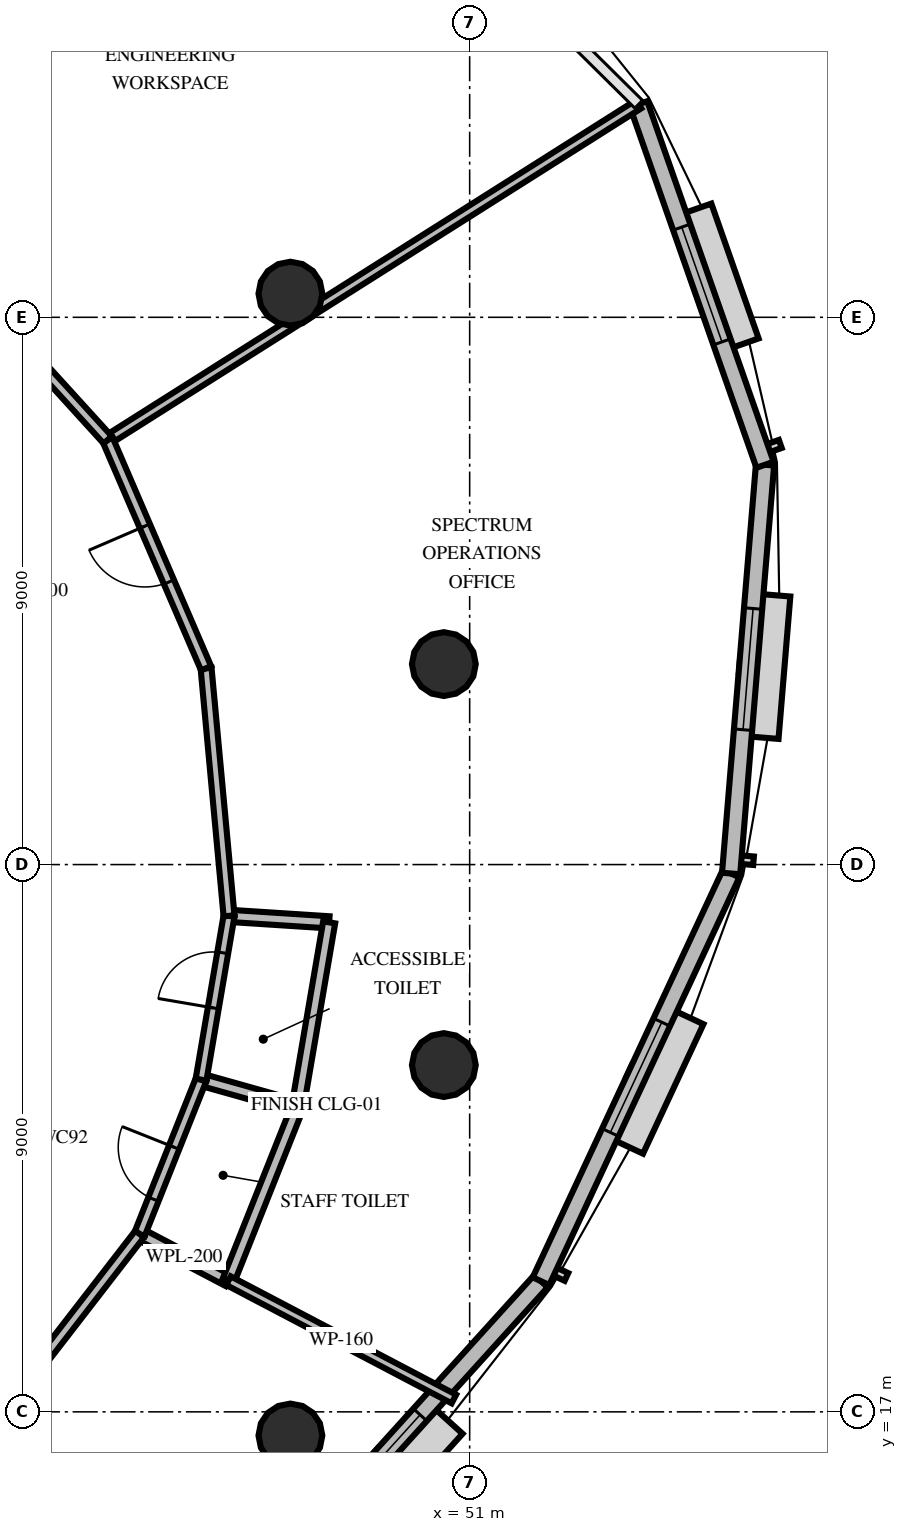
"""IFC4 building model, lengths in metres.
Left out: names, types, materials, properties, quantities, classifications, styles, units other than length and angle.
Written with IfcOpenShell. Run it as: python <this file> out.ifc"""

import sys

from ifc_helpers import new_model, si_unit, direction, frame, frame_2d, origin, origin_2d, place, context, subcontext, project, spatial, rectangle, circle, extrude, element, fill, save


model = new_model("IFC4")
c1 = context("Model", 3, precision=1e-05, world=origin(), true_north=direction((0.0, 1.0)))
c2 = subcontext(c1, "Body", "Model", "MODEL_VIEW")
j1 = project(units=[si_unit("LENGTHUNIT", "METRE"), si_unit("PLANEANGLEUNIT", "RADIAN")], contexts=[c1])
p1 = place(None, origin())
s1 = spatial("IfcSite", under=j1, at=p1, CompositionType="ELEMENT")
p2 = place(p1, origin())
s2 = spatial("IfcBuilding", under=s1, at=p2, CompositionType="ELEMENT")
p3 = place(p2, frame((0.0, 0.0, 170.0)))
s3 = spatial("IfcBuildingStorey", under=s2, at=p3, CompositionType="ELEMENT", Elevation=170.0)
for number, where, z_axis, x_axis in (
    (1, (50.575, 29.297, 0.0), (0.0, 0.0, 1.0), (1.0, 0.0, 0.0)),
    (2, (48.052, 35.389, 0.0), (0.0, 0.0, 1.0), (1.0, 0.0, 0.0)),
    (3, (48.052, 16.611, 0.0), (0.0, 0.0, 1.0), (1.0, 0.0, 0.0)),
    (4, (50.575, 22.703, 0.0), (0.0, 0.0, 1.0), (1.0, 0.0, 0.0)),
):
    element("IfcColumn", number, at=place(p3, frame(where, z_axis=z_axis, x_axis=x_axis)), inside=s3, PredefinedType="COLUMN", context=c2, shape_type="SweptSolid", body=[
        extrude(circle(Radius=0.525, at=origin_2d()), origin(), (0.0, 0.0, 1.0), 3.6),
    ])
p4 = place(p3, frame((46.854, 13.271, 0.0), z_axis=(0.0, 0.0, 1.0), x_axis=(0.670978643617, 0.741476675162, 0.0)))
e5 = element("IfcWall", 5, at=p4, inside=s3, PredefinedType="SOLIDWALL", context=c2, shape_type="SweptSolid", body=[
    extrude(rectangle(XDim=7.927, YDim=0.3, at=frame_2d((3.963, 0.0))), origin(), (0.0, 0.0, 1.0), 2.66),
])
p5 = place(p4, frame((2.964, 0.0, 0.8)))
e6 = element("IfcOpeningElement", 6, at=p5, cuts=e5, PredefinedType="OPENING", context=c2, shape_type="SweptSolid", body=[
    extrude(rectangle(XDim=2.0, YDim=1.85, at=frame_2d((1.0, 0.925))), frame((0.0, 0.16, 0.0), z_axis=(0.0, -1.0, 0.0), x_axis=(1.0, 0.0, 0.0)), (0.0, 0.0, 1.0), 0.32),
])
p6 = place(p3, frame((52.173, 19.149, 0.0), z_axis=(0.0, 0.0, 1.0), x_axis=(0.422665033613, 0.906285975485, 0.0)))
e7 = element("IfcWall", 7, at=p6, inside=s3, PredefinedType="SOLIDWALL", context=c2, shape_type="SweptSolid", body=[
    extrude(rectangle(XDim=7.398, YDim=0.3, at=frame_2d((3.699, 0.0))), origin(), (0.0, 0.0, 1.0), 2.66),
])
p7 = place(p6, frame((2.699, 0.0, 0.8)))
e8 = element("IfcOpeningElement", 8, at=p7, cuts=e7, PredefinedType="OPENING", context=c2, shape_type="SweptSolid", body=[
    extrude(rectangle(XDim=2.0, YDim=1.85, at=frame_2d((1.0, 0.925))), frame((0.0, 0.16, 0.0), z_axis=(0.0, -1.0, 0.0), x_axis=(1.0, 0.0, 0.0)), (0.0, 0.0, 1.0), 0.32),
])
p8 = place(p3, frame((55.3, 25.853, 0.0), z_axis=(0.0, 0.0, 1.0), x_axis=(0.082706983643, 0.996573908376, 0.0)))
e9 = element("IfcWall", 9, at=p8, inside=s3, PredefinedType="SOLIDWALL", context=c2, shape_type="SweptSolid", body=[
    extrude(rectangle(XDim=6.745, YDim=0.3, at=frame_2d((3.373, 0.0))), origin(), (0.0, 0.0, 1.0), 2.66),
])
p9 = place(p8, frame((2.373, 0.0, 0.8)))
e10 = element("IfcOpeningElement", 10, at=p9, cuts=e9, PredefinedType="OPENING", context=c2, shape_type="SweptSolid", body=[
    extrude(rectangle(XDim=2.0, YDim=1.85, at=frame_2d((1.0, 0.925))), frame((0.0, 0.16, 0.0), z_axis=(0.0, -1.0, 0.0), x_axis=(1.0, 0.0, 0.0)), (0.0, 0.0, 1.0), 0.32),
])
p10 = place(p3, frame((55.858, 32.575, 0.0), z_axis=(0.0, 0.0, 1.0), x_axis=(-0.330843687111, 0.943685569826, 0.0)))
e11 = element("IfcWall", 11, at=p10, inside=s3, PredefinedType="SOLIDWALL", context=c2, shape_type="SweptSolid", body=[
    extrude(rectangle(XDim=6.283, YDim=0.3, at=frame_2d((3.141, 0.0))), origin(), (0.0, 0.0, 1.0), 2.66),
])
p11 = place(p10, frame((2.141, 0.0, 0.8)))
e12 = element("IfcOpeningElement", 12, at=p11, cuts=e11, PredefinedType="OPENING", context=c2, shape_type="SweptSolid", body=[
    extrude(rectangle(XDim=2.0, YDim=1.85, at=frame_2d((1.0, 0.925))), frame((0.0, 0.16, 0.0), z_axis=(0.0, -1.0, 0.0), x_axis=(1.0, 0.0, 0.0)), (0.0, 0.0, 1.0), 0.32),
])
p12 = place(p3, frame((45.572, 19.925, 0.0), z_axis=(0.0, 0.0, 1.0), x_axis=(0.885373544206, -0.464880293431, 0.0)))
e13 = element("IfcWall", 13, at=p12, inside=s3, PredefinedType="PLUMBINGWALL", context=c2, shape_type="SweptSolid", body=[
    extrude(rectangle(XDim=1.65, YDim=0.2, at=frame_2d((0.825, 0.0))), origin(), (0.0, 0.0, 1.0), 2.46),
])
p13 = place(p3, frame((46.583, 22.463, 0.0), z_axis=(0.0, 0.0, 1.0), x_axis=(0.962682268187, -0.27063416362, 0.0)))
e14 = element("IfcWall", 14, at=p13, inside=s3, PredefinedType="PLUMBINGWALL", context=c2, shape_type="SweptSolid", body=[
    extrude(rectangle(XDim=1.65, YDim=0.2, at=frame_2d((0.825, 0.0))), origin(), (0.0, 0.0, 1.0), 2.46),
])
p14 = place(p3, frame((47.033, 19.157, 0.0), z_axis=(0.0, 0.0, 1.0), x_axis=(0.36976244951, 0.929126326681, 0.0)))
e15 = element("IfcWall", 15, at=p14, inside=s3, PredefinedType="PLUMBINGWALL", context=c2, shape_type="SweptSolid", body=[
    extrude(rectangle(XDim=3.077, YDim=0.2, at=frame_2d((1.539, 0.0))), origin(), (0.0, 0.0, 1.0), 2.46),
])
p15 = place(p3, frame((45.572, 19.925, 0.0), z_axis=(0.0, 0.0, 1.0), x_axis=(0.369803470727, 0.929110000505, 0.0)))
e16 = element("IfcWall", 16, at=p15, inside=s3, PredefinedType="PARTITIONING", context=c2, shape_type="SweptSolid", body=[
    extrude(rectangle(XDim=2.732, YDim=0.18, at=frame_2d((1.366, 0.0))), origin(), (0.0, 0.0, 1.0), 2.46),
])
p16 = place(p15, frame((0.616, 0.0, 0.0)))
e17 = element("IfcOpeningElement", 17, at=p16, cuts=e16, PredefinedType="OPENING", context=c2, shape_type="SweptSolid", body=[
    extrude(rectangle(XDim=0.92, YDim=2.1, at=frame_2d((0.46, 1.05))), frame((0.0, 0.1, 0.0), z_axis=(0.0, -1.0, 0.0), x_axis=(1.0, 0.0, 0.0)), (0.0, 0.0, 1.0), 0.2),
])
p17 = place(p3, frame((47.043, 25.156, 0.0), z_axis=(0.0, 0.0, 1.0), x_axis=(0.997916713172, -0.064515374695, 0.0)))
e18 = element("IfcWall", 18, at=p17, inside=s3, PredefinedType="PLUMBINGWALL", context=c2, shape_type="SweptSolid", body=[
    extrude(rectangle(XDim=1.65, YDim=0.2, at=frame_2d((0.825, 0.0))), origin(), (0.0, 0.0, 1.0), 2.46),
])
p18 = place(p3, frame((48.171, 22.017, 0.0), z_axis=(0.0, 0.0, 1.0), x_axis=(0.168437483461, 0.985712338446, 0.0)))
e19 = element("IfcWall", 19, at=p18, inside=s3, PredefinedType="PLUMBINGWALL", context=c2, shape_type="SweptSolid", body=[
    extrude(rectangle(XDim=3.077, YDim=0.2, at=frame_2d((1.539, 0.0))), origin(), (0.0, 0.0, 1.0), 2.46),
])
p19 = place(p3, frame((46.583, 22.463, 0.0), z_axis=(0.0, 0.0, 1.0), x_axis=(0.168440467482, 0.985711828535, 0.0)))
e20 = element("IfcWall", 20, at=p19, inside=s3, PredefinedType="PARTITIONING", context=c2, shape_type="SweptSolid", body=[
    extrude(rectangle(XDim=2.732, YDim=0.18, at=frame_2d((1.366, 0.0))), origin(), (0.0, 0.0, 1.0), 2.46),
])
p20 = place(p19, frame((1.197, 0.0, 0.0)))
e21 = element("IfcOpeningElement", 21, at=p20, cuts=e20, PredefinedType="OPENING", context=c2, shape_type="SweptSolid", body=[
    extrude(rectangle(XDim=0.92, YDim=2.1, at=frame_2d((0.46, 1.05))), frame((0.0, 0.1, 0.0), z_axis=(0.0, -1.0, 0.0), x_axis=(1.0, 0.0, 0.0)), (0.0, 0.0, 1.0), 0.2),
])
p21 = place(p3, frame((47.033, 19.157, 0.0), z_axis=(0.0, 0.0, 1.0), x_axis=(0.885413499746, -0.464804189383, 0.0)))
e22 = element("IfcWall", 22, at=p21, inside=s3, PredefinedType="PARTITIONING", context=c2, shape_type="SweptSolid", body=[
    extrude(rectangle(XDim=4.187, YDim=0.16, at=frame_2d((2.094, 0.0))), origin(), (0.0, 0.0, 1.0), 2.46),
])
p22 = place(p3, frame((45.048, 32.984, 0.0), z_axis=(0.0, 0.0, 1.0), x_axis=(0.845251823033, 0.534368183614, 0.0)))
e23 = element("IfcWall", 23, at=p22, inside=s3, PredefinedType="PARTITIONING", context=c2, shape_type="SweptSolid", body=[
    extrude(rectangle(XDim=10.33, YDim=0.16, at=frame_2d((5.165, 0.0))), origin(), (0.0, 0.0, 1.0), 2.46),
])
p23 = place(p3, frame((47.043, 25.156, 0.0), z_axis=(0.0, 0.0, 1.0), x_axis=(-0.092360448677, 0.995725638678, 0.0)))
e24 = element("IfcWall", 24, at=p23, inside=s3, PredefinedType="PARTITIONING", context=c2, shape_type="SweptSolid", body=[
    extrude(rectangle(XDim=4.089, YDim=0.18, at=frame_2d((2.045, 0.0))), origin(), (0.0, 0.0, 1.0), 2.46),
])
p24 = place(p3, frame((46.665, 29.228, 0.0), z_axis=(0.0, 0.0, 1.0), x_axis=(-0.395547192087, 0.918445653717, 0.0)))
e25 = element("IfcWall", 25, at=p24, inside=s3, PredefinedType="PARTITIONING", context=c2, shape_type="SweptSolid", body=[
    extrude(rectangle(XDim=4.089, YDim=0.18, at=frame_2d((2.044, 0.0))), origin(), (0.0, 0.0, 1.0), 2.46),
])
p25 = place(p24, frame((1.545, 0.0, 0.0)))
e26 = element("IfcOpeningElement", 26, at=p25, cuts=e25, PredefinedType="OPENING", context=c2, shape_type="SweptSolid", body=[
    extrude(rectangle(XDim=1.0, YDim=2.15, at=frame_2d((0.5, 1.075))), frame((0.0, 0.1, 0.0), z_axis=(0.0, -1.0, 0.0), x_axis=(1.0, 0.0, 0.0)), (0.0, 0.0, 1.0), 0.2),
])
p26 = place(p3, frame((45.048, 32.984, 0.0), z_axis=(0.0, 0.0, 1.0), x_axis=(-0.673002003664, 0.739640658066, 0.0)))
e27 = element("IfcWall", 27, at=p26, inside=s3, PredefinedType="PARTITIONING", context=c2, shape_type="SweptSolid", body=[
    extrude(rectangle(XDim=4.539, YDim=0.18, at=frame_2d((2.27, 0.0))), origin(), (0.0, 0.0, 1.0), 2.46),
])
p27 = place(p26, frame((2.467, 0.0, 0.0)))
e28 = element("IfcOpeningElement", 28, at=p27, cuts=e27, PredefinedType="OPENING", context=c2, shape_type="SweptSolid", body=[
    extrude(rectangle(XDim=1.15, YDim=2.15, at=frame_2d((0.575, 1.075))), frame((0.0, 0.1, 0.0), z_axis=(0.0, -1.0, 0.0), x_axis=(1.0, 0.0, 0.0)), (0.0, 0.0, 1.0), 0.2),
])
p28 = place(p3, frame((42.796, 16.333, 0.0), z_axis=(0.0, 0.0, 1.0), x_axis=(0.611494954268, 0.791248330744, 0.0)))
e29 = element("IfcWall", 29, at=p28, inside=s3, PredefinedType="PARTITIONING", context=c2, shape_type="SweptSolid", body=[
    extrude(rectangle(XDim=4.539, YDim=0.18, at=frame_2d((2.27, 0.0))), origin(), (0.0, 0.0, 1.0), 2.46),
])
p29 = place(p5, origin())
e30 = element("IfcWindow", 30, at=p29, inside=s3, PartitioningType="SINGLE_PANEL", PredefinedType="WINDOW", context=c2, shape_type="SweptSolid", body=[
    extrude(rectangle(XDim=2.0, YDim=1.85, at=frame_2d((1.0, 0.925))), frame((0.0, 0.03, 0.0), z_axis=(0.0, -1.0, 0.0), x_axis=(1.0, 0.0, 0.0)), (0.0, 0.0, 1.0), 0.06),
])
fill(e6, e30)
p30 = place(p7, origin())
e31 = element("IfcWindow", 31, at=p30, inside=s3, PartitioningType="SINGLE_PANEL", PredefinedType="WINDOW", context=c2, shape_type="SweptSolid", body=[
    extrude(rectangle(XDim=2.0, YDim=1.85, at=frame_2d((1.0, 0.925))), frame((0.0, 0.03, 0.0), z_axis=(0.0, -1.0, 0.0), x_axis=(1.0, 0.0, 0.0)), (0.0, 0.0, 1.0), 0.06),
])
fill(e8, e31)
p31 = place(p9, origin())
e32 = element("IfcWindow", 32, at=p31, inside=s3, PartitioningType="SINGLE_PANEL", PredefinedType="WINDOW", context=c2, shape_type="SweptSolid", body=[
    extrude(rectangle(XDim=2.0, YDim=1.85, at=frame_2d((1.0, 0.925))), frame((0.0, 0.03, 0.0), z_axis=(0.0, -1.0, 0.0), x_axis=(1.0, 0.0, 0.0)), (0.0, 0.0, 1.0), 0.06),
])
fill(e10, e32)
p32 = place(p11, origin())
e33 = element("IfcWindow", 33, at=p32, inside=s3, PartitioningType="SINGLE_PANEL", PredefinedType="WINDOW", context=c2, shape_type="SweptSolid", body=[
    extrude(rectangle(XDim=2.0, YDim=1.85, at=frame_2d((1.0, 0.925))), frame((0.0, 0.03, 0.0), z_axis=(0.0, -1.0, 0.0), x_axis=(1.0, 0.0, 0.0)), (0.0, 0.0, 1.0), 0.06),
])
fill(e12, e33)
p33 = place(p16, origin())
e34 = element("IfcDoor", 34, at=p33, inside=s3, OperationType="SINGLE_SWING_RIGHT", PredefinedType="DOOR", context=c2, shape_type="SweptSolid", body=[
    extrude(rectangle(XDim=0.92, YDim=2.1, at=frame_2d((0.46, 1.05))), frame((0.0, 0.025, 0.0), z_axis=(0.0, -1.0, 0.0), x_axis=(1.0, 0.0, 0.0)), (0.0, 0.0, 1.0), 0.05),
])
fill(e17, e34)
p34 = place(p20, origin())
e35 = element("IfcDoor", 35, at=p34, inside=s3, OperationType="SINGLE_SWING_LEFT", PredefinedType="DOOR", context=c2, shape_type="SweptSolid", body=[
    extrude(rectangle(XDim=0.92, YDim=2.1, at=frame_2d((0.46, 1.05))), frame((0.0, 0.025, 0.0), z_axis=(0.0, -1.0, 0.0), x_axis=(1.0, 0.0, 0.0)), (0.0, 0.0, 1.0), 0.05),
])
fill(e21, e35)
p35 = place(p25, origin())
e36 = element("IfcDoor", 36, at=p35, inside=s3, OperationType="SINGLE_SWING_RIGHT", PredefinedType="DOOR", context=c2, shape_type="SweptSolid", body=[
    extrude(rectangle(XDim=1.0, YDim=2.15, at=frame_2d((0.5, 1.075))), frame((0.0, 0.025, 0.0), z_axis=(0.0, -1.0, 0.0), x_axis=(1.0, 0.0, 0.0)), (0.0, 0.0, 1.0), 0.05),
])
fill(e26, e36)
save(model, sys.argv[1])
